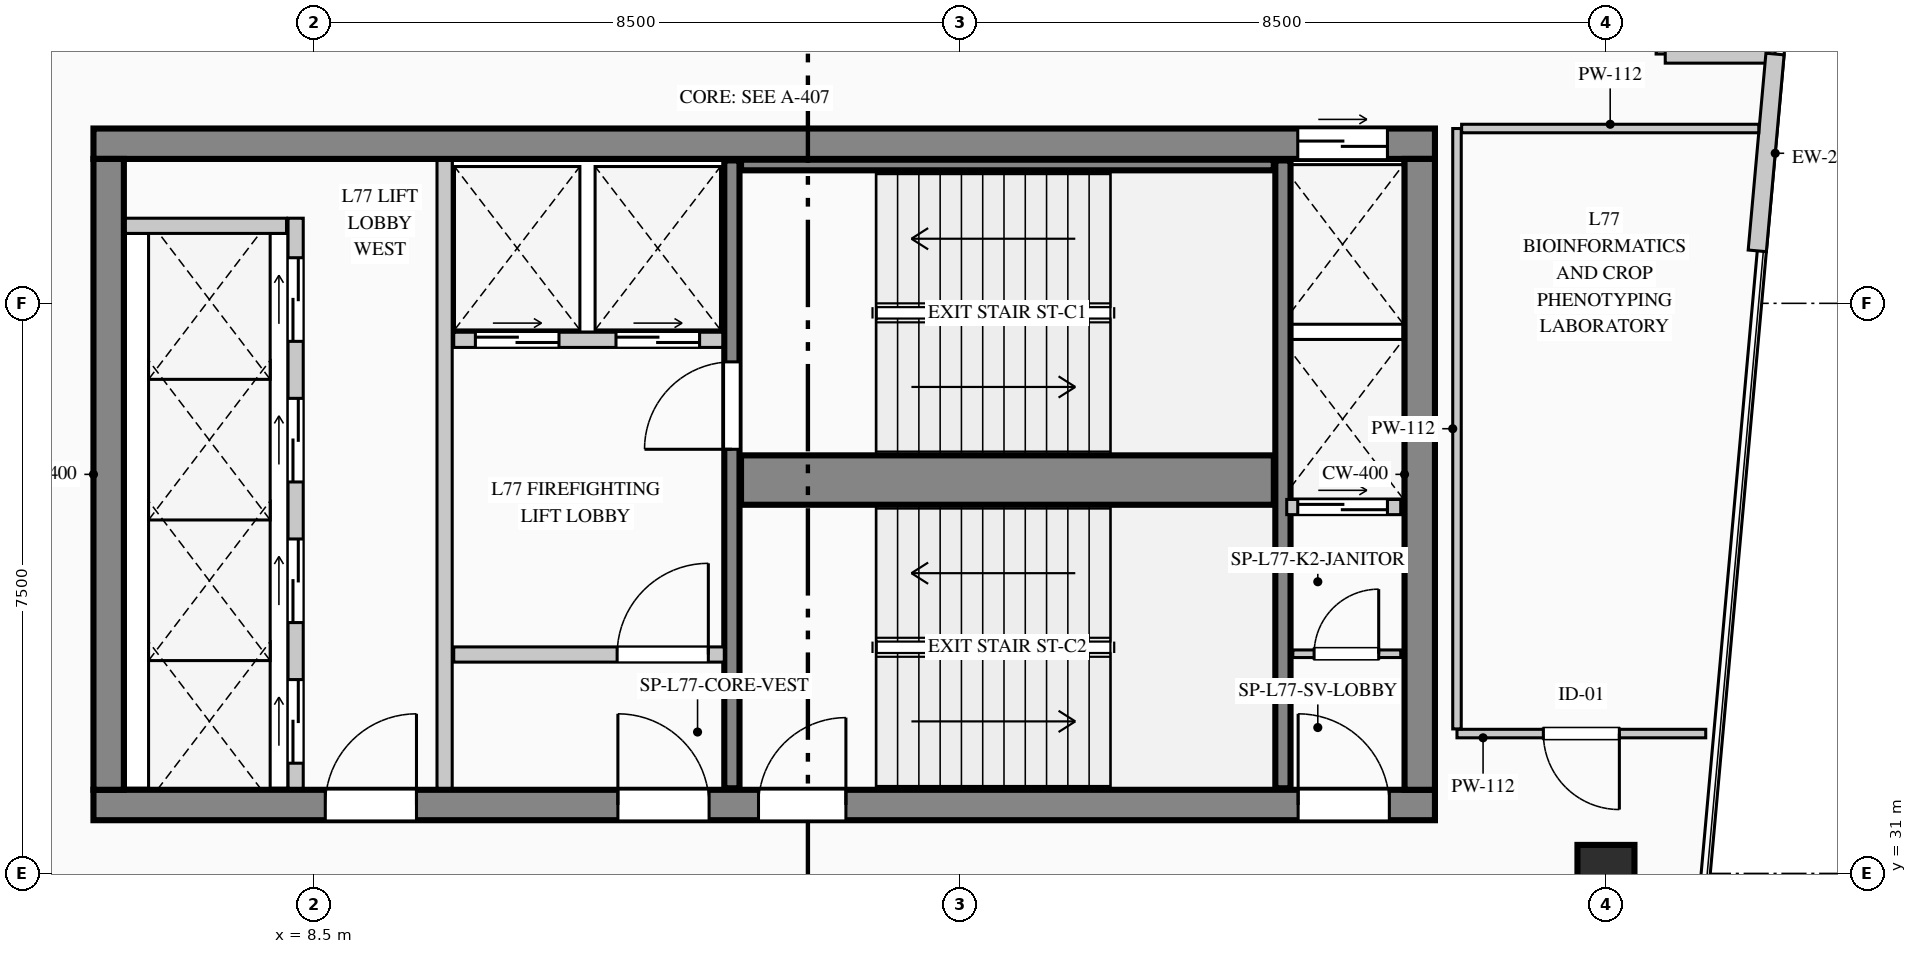
"""IFC4 building model, lengths in metres.
Left out: names, types, materials, properties, quantities, classifications, styles, units other than length and angle.
Written with IfcOpenShell. Run it as: python <this file> out.ifc"""

import sys

from ifc_helpers import new_model, si_unit, direction, frame, frame_2d, origin, origin_2d, place, context, subcontext, project, spatial, rectangle, extrude, element, fill, save


model = new_model("IFC4")
c1 = context("Model", 3, precision=1e-05, world=origin(), true_north=direction((0.0, 1.0)))
c2 = subcontext(c1, "Body", "Model", "MODEL_VIEW")
j1 = project(units=[si_unit("LENGTHUNIT", "METRE"), si_unit("PLANEANGLEUNIT", "RADIAN")], contexts=[c1])
p1 = place(None, origin())
s1 = spatial("IfcSite", under=j1, at=p1, CompositionType="ELEMENT")
p2 = place(p1, origin())
s2 = spatial("IfcBuilding", under=s1, at=p2, CompositionType="ELEMENT")
p3 = place(p2, frame((0.0, 0.0, 319.9)))
s3 = spatial("IfcBuildingStorey", under=s2, at=p3, CompositionType="ELEMENT", Elevation=319.9)
p4 = place(p3, frame((5.6, 40.6, 0.0), z_axis=(0.0, 0.0, 1.0), x_axis=(1.0, 0.0, 0.0)))
e1 = element("IfcWall", 1, at=p4, inside=s3, PredefinedType="SHEAR", context=c2, shape_type="SweptSolid", body=[
    extrude(rectangle(XDim=17.65, YDim=0.4, at=frame_2d((8.825, 0.0))), origin(), (0.0, 0.0, 1.0), 4.15),
])
p5 = place(p4, frame((15.845, 0.0, 0.0)))
e2 = element("IfcOpeningElement", 2, at=p5, cuts=e1, PredefinedType="OPENING", context=c2, shape_type="SweptSolid", body=[
    extrude(rectangle(XDim=1.18, YDim=2.25, at=frame_2d((0.59, 1.125))), frame((0.0, 0.21, 0.0), z_axis=(0.0, -1.0, 0.0), x_axis=(1.0, 0.0, 0.0)), (0.0, 0.0, 1.0), 0.42),
])
p6 = place(p3, frame((5.6, 31.9, 0.0), z_axis=(0.0, 0.0, 1.0), x_axis=(1.0, 0.0, 0.0)))
e3 = element("IfcWall", 3, at=p6, inside=s3, PredefinedType="SHEAR", context=c2, shape_type="SweptSolid", body=[
    extrude(rectangle(XDim=17.65, YDim=0.4, at=frame_2d((8.825, 0.0))), origin(), (0.0, 0.0, 1.0), 4.15),
])
p7 = place(p6, frame((3.05, 0.0, 0.0)))
e4 = element("IfcOpeningElement", 4, at=p7, cuts=e3, PredefinedType="OPENING", context=c2, shape_type="SweptSolid", body=[
    extrude(rectangle(XDim=1.2, YDim=2.2, at=frame_2d((0.6, 1.1))), frame((0.0, 0.21, 0.0), z_axis=(0.0, -1.0, 0.0), x_axis=(1.0, 0.0, 0.0)), (0.0, 0.0, 1.0), 0.42),
])
p8 = place(p6, frame((6.9, 0.0, 0.0)))
e5 = element("IfcOpeningElement", 5, at=p8, cuts=e3, PredefinedType="OPENING", context=c2, shape_type="SweptSolid", body=[
    extrude(rectangle(XDim=1.2, YDim=2.2, at=frame_2d((0.6, 1.1))), frame((0.0, 0.21, 0.0), z_axis=(0.0, -1.0, 0.0), x_axis=(1.0, 0.0, 0.0)), (0.0, 0.0, 1.0), 0.42),
])
p9 = place(p6, frame((8.75, 0.0, 0.0)))
e6 = element("IfcOpeningElement", 6, at=p9, cuts=e3, PredefinedType="OPENING", context=c2, shape_type="SweptSolid", body=[
    extrude(rectangle(XDim=1.15, YDim=2.2, at=frame_2d((0.575, 1.1))), frame((0.0, 0.21, 0.0), z_axis=(0.0, -1.0, 0.0), x_axis=(1.0, 0.0, 0.0)), (0.0, 0.0, 1.0), 0.42),
])
p10 = place(p6, frame((15.85, 0.0, 0.0)))
e7 = element("IfcOpeningElement", 7, at=p10, cuts=e3, PredefinedType="OPENING", context=c2, shape_type="SweptSolid", body=[
    extrude(rectangle(XDim=1.2, YDim=2.2, at=frame_2d((0.6, 1.1))), frame((0.0, 0.21, 0.0), z_axis=(0.0, -1.0, 0.0), x_axis=(1.0, 0.0, 0.0)), (0.0, 0.0, 1.0), 0.42),
])
for number, where, z_axis, x_axis in (
    (8, (5.8, 32.1, 0.0), (0.0, 0.0, 1.0), (0.0, 1.0, 0.0)),
    (9, (23.05, 32.1, 0.0), (0.0, 0.0, 1.0), (0.0, 1.0, 0.0)),
):
    element("IfcWall", number, at=place(p3, frame(where, z_axis=z_axis, x_axis=x_axis)), inside=s3, PredefinedType="SHEAR", context=c2, shape_type="SweptSolid", body=[
        extrude(rectangle(XDim=8.3, YDim=0.4, at=frame_2d((4.15, 0.0))), origin(), (0.0, 0.0, 1.0), 4.15),
    ])
p11 = place(p3, frame((14.0, 32.12, 0.0), z_axis=(0.0, 0.0, 1.0), x_axis=(0.0, 1.0, 0.0)))
e10 = element("IfcWall", 10, at=p11, inside=s3, PredefinedType="SHEAR", context=c2, shape_type="SweptSolid", body=[
    extrude(rectangle(XDim=8.26, YDim=0.2, at=frame_2d((4.13, 0.0))), origin(), (0.0, 0.0, 1.0), 4.15),
])
p12 = place(p11, frame((4.46, 0.0, 0.0)))
e11 = element("IfcOpeningElement", 11, at=p12, cuts=e10, PredefinedType="OPENING", context=c2, shape_type="SweptSolid", body=[
    extrude(rectangle(XDim=1.15, YDim=2.2, at=frame_2d((0.575, 1.1))), frame((0.0, 0.11, 0.0), z_axis=(0.0, -1.0, 0.0), x_axis=(1.0, 0.0, 0.0)), (0.0, 0.0, 1.0), 0.22),
])
p13 = place(p3, frame((14.12, 36.175, 0.0), z_axis=(0.0, 0.0, 1.0), x_axis=(1.0, 0.0, 0.0)))
e12 = element("IfcWall", 12, at=p13, inside=s3, PredefinedType="SHEAR", context=c2, shape_type="SweptSolid", body=[
    extrude(rectangle(XDim=7.01, YDim=0.65, at=frame_2d((3.505, 0.0))), origin(), (0.0, 0.0, 1.0), 4.15),
])
p14 = place(p3, frame((21.25, 32.12, 0.0), z_axis=(0.0, 0.0, 1.0), x_axis=(0.0, 1.0, 0.0)))
e13 = element("IfcWall", 13, at=p14, inside=s3, PredefinedType="SHEAR", context=c2, shape_type="SweptSolid", body=[
    extrude(rectangle(XDim=8.26, YDim=0.2, at=frame_2d((4.13, 0.0))), origin(), (0.0, 0.0, 1.0), 4.15),
])
p15 = place(p3, frame((14.12, 40.32, 0.0), z_axis=(0.0, 0.0, 1.0), x_axis=(1.0, 0.0, 0.0)))
e14 = element("IfcWall", 14, at=p15, inside=s3, PredefinedType="SHEAR", context=c2, shape_type="SweptSolid", body=[
    extrude(rectangle(XDim=7.01, YDim=0.14, at=frame_2d((3.505, 0.0))), origin(), (0.0, 0.0, 1.0), 4.15),
])
p16 = place(p3, frame((25.5, 31.0, 0.0), z_axis=(0.0, 0.0, 1.0), x_axis=(1.0, 0.0, 0.0)))
e15 = element("IfcColumn", 15, at=p16, inside=s3, PredefinedType="COLUMN", context=c2, shape_type="SweptSolid", body=[
    extrude(rectangle(XDim=0.75, YDim=0.75, at=origin_2d()), origin(), (0.0, 0.0, 1.0), 4.15),
])
p17 = place(p3, frame((26.28, 43.38, 0.0), z_axis=(0.0, 0.0, 1.0), x_axis=(0.0, -1.0, 0.0)))
e16 = element("IfcWall", 16, at=p17, inside=s3, PredefinedType="STANDARD", context=c2, shape_type="SweptSolid", body=[
    extrude(rectangle(XDim=1.6, YDim=0.24, at=frame_2d((0.8, 0.0))), origin(), (0.0, 0.0, 1.0), 3.83),
])
p18 = place(p3, frame((26.28, 41.78, 0.0), z_axis=(0.0, 0.0, 1.0), x_axis=(1.0, 0.0, 0.0)))
e17 = element("IfcWall", 17, at=p18, inside=s3, PredefinedType="STANDARD", context=c2, shape_type="SweptSolid", body=[
    extrude(rectangle(XDim=1.444, YDim=0.24, at=frame_2d((0.722, 0.0))), origin(), (0.0, 0.0, 1.0), 3.83),
])
p19 = place(p3, frame((27.724, 41.78, 0.0), z_axis=(0.0, 0.0, 1.0), x_axis=(-0.089765303723, -0.995962946222, 0.0)))
e18 = element("IfcWall", 18, at=p19, inside=s3, PredefinedType="STANDARD", context=c2, shape_type="SweptSolid", body=[
    extrude(rectangle(XDim=2.6, YDim=0.24, at=frame_2d((1.3, 0.0))), origin(), (0.0, 0.0, 1.0), 3.83),
])
p20 = place(p3, frame((8.26, 32.12, 0.0), z_axis=(0.0, 0.0, 1.0), x_axis=(0.0, 1.0, 0.0)))
e19 = element("IfcWall", 19, at=p20, inside=s3, PredefinedType="PARTITIONING", context=c2, shape_type="SweptSolid", body=[
    extrude(rectangle(XDim=7.5, YDim=0.2, at=frame_2d((3.75, 0.0))), origin(), (0.0, 0.0, 1.0), 3.83),
])
p21 = place(p20, frame((0.33, 0.0, 0.0)))
e20 = element("IfcOpeningElement", 20, at=p21, cuts=e19, PredefinedType="OPENING", context=c2, shape_type="SweptSolid", body=[
    extrude(rectangle(XDim=1.1, YDim=2.2, at=frame_2d((0.55, 1.1))), frame((0.0, 0.11, 0.0), z_axis=(0.0, -1.0, 0.0), x_axis=(1.0, 0.0, 0.0)), (0.0, 0.0, 1.0), 0.22),
])
p22 = place(p20, frame((2.18, 0.0, 0.0)))
e21 = element("IfcOpeningElement", 21, at=p22, cuts=e19, PredefinedType="OPENING", context=c2, shape_type="SweptSolid", body=[
    extrude(rectangle(XDim=1.1, YDim=2.2, at=frame_2d((0.55, 1.1))), frame((0.0, 0.11, 0.0), z_axis=(0.0, -1.0, 0.0), x_axis=(1.0, 0.0, 0.0)), (0.0, 0.0, 1.0), 0.22),
])
p23 = place(p20, frame((4.03, 0.0, 0.0)))
e22 = element("IfcOpeningElement", 22, at=p23, cuts=e19, PredefinedType="OPENING", context=c2, shape_type="SweptSolid", body=[
    extrude(rectangle(XDim=1.1, YDim=2.2, at=frame_2d((0.55, 1.1))), frame((0.0, 0.11, 0.0), z_axis=(0.0, -1.0, 0.0), x_axis=(1.0, 0.0, 0.0)), (0.0, 0.0, 1.0), 0.22),
])
p24 = place(p20, frame((5.88, 0.0, 0.0)))
e23 = element("IfcOpeningElement", 23, at=p24, cuts=e19, PredefinedType="OPENING", context=c2, shape_type="SweptSolid", body=[
    extrude(rectangle(XDim=1.1, YDim=2.2, at=frame_2d((0.55, 1.1))), frame((0.0, 0.11, 0.0), z_axis=(0.0, -1.0, 0.0), x_axis=(1.0, 0.0, 0.0)), (0.0, 0.0, 1.0), 0.22),
])
p25 = place(p3, frame((6.02, 39.52, 0.0), z_axis=(0.0, 0.0, 1.0), x_axis=(1.0, 0.0, 0.0)))
e24 = element("IfcWall", 24, at=p25, inside=s3, PredefinedType="PARTITIONING", context=c2, shape_type="SweptSolid", body=[
    extrude(rectangle(XDim=2.12, YDim=0.2, at=frame_2d((1.06, 0.0))), origin(), (0.0, 0.0, 1.0), 3.83),
])
p26 = place(p3, frame((10.22, 32.12, 0.0), z_axis=(0.0, 0.0, 1.0), x_axis=(0.0, 1.0, 0.0)))
e25 = element("IfcWall", 25, at=p26, inside=s3, PredefinedType="PARTITIONING", context=c2, shape_type="SweptSolid", body=[
    extrude(rectangle(XDim=8.26, YDim=0.2, at=frame_2d((4.13, 0.0))), origin(), (0.0, 0.0, 1.0), 3.83),
])
p27 = place(p3, frame((10.34, 38.02, 0.0), z_axis=(0.0, 0.0, 1.0), x_axis=(1.0, 0.0, 0.0)))
e26 = element("IfcWall", 26, at=p27, inside=s3, PredefinedType="PARTITIONING", context=c2, shape_type="SweptSolid", body=[
    extrude(rectangle(XDim=3.54, YDim=0.2, at=frame_2d((1.77, 0.0))), origin(), (0.0, 0.0, 1.0), 3.83),
])
p28 = place(p27, frame((0.285, 0.0, 0.0)))
e27 = element("IfcOpeningElement", 27, at=p28, cuts=e26, PredefinedType="OPENING", context=c2, shape_type="SweptSolid", body=[
    extrude(rectangle(XDim=1.1, YDim=2.2, at=frame_2d((0.55, 1.1))), frame((0.0, 0.11, 0.0), z_axis=(0.0, -1.0, 0.0), x_axis=(1.0, 0.0, 0.0)), (0.0, 0.0, 1.0), 0.22),
])
p29 = place(p27, frame((2.135, 0.0, 0.0)))
e28 = element("IfcOpeningElement", 28, at=p29, cuts=e26, PredefinedType="OPENING", context=c2, shape_type="SweptSolid", body=[
    extrude(rectangle(XDim=1.1, YDim=2.2, at=frame_2d((0.55, 1.1))), frame((0.0, 0.11, 0.0), z_axis=(0.0, -1.0, 0.0), x_axis=(1.0, 0.0, 0.0)), (0.0, 0.0, 1.0), 0.22),
])
p30 = place(p3, frame((10.34, 33.88, 0.0), z_axis=(0.0, 0.0, 1.0), x_axis=(1.0, 0.0, 0.0)))
e29 = element("IfcWall", 29, at=p30, inside=s3, PredefinedType="PARTITIONING", context=c2, shape_type="SweptSolid", body=[
    extrude(rectangle(XDim=3.56, YDim=0.2, at=frame_2d((1.78, 0.0))), origin(), (0.0, 0.0, 1.0), 3.83),
])
p31 = place(p30, frame((2.15, 0.0, 0.0)))
e30 = element("IfcOpeningElement", 30, at=p31, cuts=e29, PredefinedType="OPENING", context=c2, shape_type="SweptSolid", body=[
    extrude(rectangle(XDim=1.2, YDim=2.2, at=frame_2d((0.6, 1.1))), frame((0.0, 0.11, 0.0), z_axis=(0.0, -1.0, 0.0), x_axis=(1.0, 0.0, 0.0)), (0.0, 0.0, 1.0), 0.22),
])
p32 = place(p3, frame((21.38, 33.89, 0.0), z_axis=(0.0, 0.0, 1.0), x_axis=(1.0, 0.0, 0.0)))
e31 = element("IfcWall", 31, at=p32, inside=s3, PredefinedType="PARTITIONING", context=c2, shape_type="SweptSolid", body=[
    extrude(rectangle(XDim=1.42, YDim=0.1, at=frame_2d((0.71, 0.0))), origin(), (0.0, 0.0, 1.0), 3.83),
])
p33 = place(p32, frame((0.28, 0.0, 0.0)))
e32 = element("IfcOpeningElement", 32, at=p33, cuts=e31, PredefinedType="OPENING", context=c2, shape_type="SweptSolid", body=[
    extrude(rectangle(XDim=0.85, YDim=2.1, at=frame_2d((0.425, 1.05))), frame((0.0, 0.06, 0.0), z_axis=(0.0, -1.0, 0.0), x_axis=(1.0, 0.0, 0.0)), (0.0, 0.0, 1.0), 0.12),
])
p34 = place(p3, frame((21.3, 35.82, 0.0), z_axis=(0.0, 0.0, 1.0), x_axis=(1.0, 0.0, 0.0)))
e33 = element("IfcWall", 33, at=p34, inside=s3, PredefinedType="PARTITIONING", context=c2, shape_type="SweptSolid", body=[
    extrude(rectangle(XDim=1.5, YDim=0.2, at=frame_2d((0.75, 0.0))), origin(), (0.0, 0.0, 1.0), 3.83),
])
p35 = place(p34, frame((0.145, 0.0, 0.0)))
e34 = element("IfcOpeningElement", 34, at=p35, cuts=e33, PredefinedType="OPENING", context=c2, shape_type="SweptSolid", body=[
    extrude(rectangle(XDim=1.18, YDim=2.25, at=frame_2d((0.59, 1.125))), frame((0.0, 0.11, 0.0), z_axis=(0.0, -1.0, 0.0), x_axis=(1.0, 0.0, 0.0)), (0.0, 0.0, 1.0), 0.22),
])
p36 = place(p3, frame((26.813, 32.84, 0.0), z_axis=(0.0, 0.0, 1.0), x_axis=(-1.0, 0.0, 0.0)))
e35 = element("IfcWall", 35, at=p36, inside=s3, PredefinedType="PARTITIONING", context=c2, shape_type="SweptSolid", body=[
    extrude(rectangle(XDim=3.273, YDim=0.112, at=frame_2d((1.636, 0.0))), origin(), (0.0, 0.0, 1.0), 3.83),
])
p37 = place(p36, frame((1.136, 0.0, 0.0)))
e36 = element("IfcOpeningElement", 36, at=p37, cuts=e35, PredefinedType="OPENING", context=c2, shape_type="SweptSolid", body=[
    extrude(rectangle(XDim=1.0, YDim=2.15, at=frame_2d((0.5, 1.075))), frame((0.0, 0.066, 0.0), z_axis=(0.0, -1.0, 0.0), x_axis=(1.0, 0.0, 0.0)), (0.0, 0.0, 1.0), 0.132),
])
p38 = place(p3, frame((23.54, 32.901, 0.0), z_axis=(0.0, 0.0, 1.0), x_axis=(0.0, 1.0, 0.0)))
e37 = element("IfcWall", 37, at=p38, inside=s3, PredefinedType="PARTITIONING", context=c2, shape_type="SweptSolid", body=[
    extrude(rectangle(XDim=7.899, YDim=0.112, at=frame_2d((3.95, 0.0))), origin(), (0.0, 0.0, 1.0), 3.83),
])
p39 = place(p3, frame((23.601, 40.8, 0.0), z_axis=(0.0, 0.0, 1.0), x_axis=(1.0, 0.0, 0.0)))
e38 = element("IfcWall", 38, at=p39, inside=s3, PredefinedType="PARTITIONING", context=c2, shape_type="SweptSolid", body=[
    extrude(rectangle(XDim=3.909, YDim=0.112, at=frame_2d((1.955, 0.0))), origin(), (0.0, 0.0, 1.0), 3.83),
])
p40 = place(p7, origin())
e39 = element("IfcDoor", 39, at=p40, inside=s3, OperationType="SINGLE_SWING_RIGHT", PredefinedType="DOOR", context=c2, shape_type="SweptSolid", body=[
    extrude(rectangle(XDim=1.2, YDim=2.2, at=frame_2d((0.6, 1.1))), frame((0.0, 0.025, 0.0), z_axis=(0.0, -1.0, 0.0), x_axis=(1.0, 0.0, 0.0)), (0.0, 0.0, 1.0), 0.05),
])
fill(e4, e39)
p41 = place(p8, origin())
e40 = element("IfcDoor", 40, at=p41, inside=s3, OperationType="SINGLE_SWING_LEFT", PredefinedType="DOOR", context=c2, shape_type="SweptSolid", body=[
    extrude(rectangle(XDim=1.2, YDim=2.2, at=frame_2d((0.6, 1.1))), frame((0.0, 0.025, 0.0), z_axis=(0.0, -1.0, 0.0), x_axis=(1.0, 0.0, 0.0)), (0.0, 0.0, 1.0), 0.05),
])
fill(e5, e40)
p42 = place(p9, origin())
e41 = element("IfcDoor", 41, at=p42, inside=s3, OperationType="SINGLE_SWING_RIGHT", PredefinedType="DOOR", context=c2, shape_type="SweptSolid", body=[
    extrude(rectangle(XDim=1.15, YDim=2.2, at=frame_2d((0.575, 1.1))), frame((0.0, 0.025, 0.0), z_axis=(0.0, -1.0, 0.0), x_axis=(1.0, 0.0, 0.0)), (0.0, 0.0, 1.0), 0.05),
])
fill(e6, e41)
p43 = place(p10, origin())
e42 = element("IfcDoor", 42, at=p43, inside=s3, OperationType="SINGLE_SWING_LEFT", PredefinedType="DOOR", context=c2, shape_type="SweptSolid", body=[
    extrude(rectangle(XDim=1.2, YDim=2.2, at=frame_2d((0.6, 1.1))), frame((0.0, 0.025, 0.0), z_axis=(0.0, -1.0, 0.0), x_axis=(1.0, 0.0, 0.0)), (0.0, 0.0, 1.0), 0.05),
])
fill(e7, e42)
p44 = place(p31, origin())
e43 = element("IfcDoor", 43, at=p44, inside=s3, OperationType="SINGLE_SWING_RIGHT", PredefinedType="DOOR", context=c2, shape_type="SweptSolid", body=[
    extrude(rectangle(XDim=1.2, YDim=2.2, at=frame_2d((0.6, 1.1))), frame((0.0, 0.025, 0.0), z_axis=(0.0, -1.0, 0.0), x_axis=(1.0, 0.0, 0.0)), (0.0, 0.0, 1.0), 0.05),
])
fill(e30, e43)
p45 = place(p33, origin())
e44 = element("IfcDoor", 44, at=p45, inside=s3, OperationType="SINGLE_SWING_RIGHT", PredefinedType="DOOR", context=c2, shape_type="SweptSolid", body=[
    extrude(rectangle(XDim=0.85, YDim=2.1, at=frame_2d((0.425, 1.05))), frame((0.0, 0.025, 0.0), z_axis=(0.0, -1.0, 0.0), x_axis=(1.0, 0.0, 0.0)), (0.0, 0.0, 1.0), 0.05),
])
fill(e32, e44)
p46 = place(p12, origin())
e45 = element("IfcDoor", 45, at=p46, inside=s3, OperationType="SINGLE_SWING_LEFT", PredefinedType="DOOR", context=c2, shape_type="SweptSolid", body=[
    extrude(rectangle(XDim=1.15, YDim=2.2, at=frame_2d((0.575, 1.1))), frame((0.0, 0.025, 0.0), z_axis=(0.0, -1.0, 0.0), x_axis=(1.0, 0.0, 0.0)), (0.0, 0.0, 1.0), 0.05),
])
fill(e11, e45)
p47 = place(p21, origin())
e46 = element("IfcDoor", 46, at=p47, inside=s3, OperationType="DOUBLE_DOOR_SLIDING", PredefinedType="DOOR", context=c2, shape_type="SweptSolid", body=[
    extrude(rectangle(XDim=1.1, YDim=2.2, at=frame_2d((0.55, 1.1))), frame((0.0, 0.025, 0.0), z_axis=(0.0, -1.0, 0.0), x_axis=(1.0, 0.0, 0.0)), (0.0, 0.0, 1.0), 0.05),
])
fill(e20, e46)
p48 = place(p22, origin())
e47 = element("IfcDoor", 47, at=p48, inside=s3, OperationType="DOUBLE_DOOR_SLIDING", PredefinedType="DOOR", context=c2, shape_type="SweptSolid", body=[
    extrude(rectangle(XDim=1.1, YDim=2.2, at=frame_2d((0.55, 1.1))), frame((0.0, 0.025, 0.0), z_axis=(0.0, -1.0, 0.0), x_axis=(1.0, 0.0, 0.0)), (0.0, 0.0, 1.0), 0.05),
])
fill(e21, e47)
p49 = place(p23, origin())
e48 = element("IfcDoor", 48, at=p49, inside=s3, OperationType="DOUBLE_DOOR_SLIDING", PredefinedType="DOOR", context=c2, shape_type="SweptSolid", body=[
    extrude(rectangle(XDim=1.1, YDim=2.2, at=frame_2d((0.55, 1.1))), frame((0.0, 0.025, 0.0), z_axis=(0.0, -1.0, 0.0), x_axis=(1.0, 0.0, 0.0)), (0.0, 0.0, 1.0), 0.05),
])
fill(e22, e48)
p50 = place(p24, origin())
e49 = element("IfcDoor", 49, at=p50, inside=s3, OperationType="DOUBLE_DOOR_SLIDING", PredefinedType="DOOR", context=c2, shape_type="SweptSolid", body=[
    extrude(rectangle(XDim=1.1, YDim=2.2, at=frame_2d((0.55, 1.1))), frame((0.0, 0.025, 0.0), z_axis=(0.0, -1.0, 0.0), x_axis=(1.0, 0.0, 0.0)), (0.0, 0.0, 1.0), 0.05),
])
fill(e23, e49)
p51 = place(p28, origin())
e50 = element("IfcDoor", 50, at=p51, inside=s3, OperationType="DOUBLE_DOOR_SLIDING", PredefinedType="DOOR", context=c2, shape_type="SweptSolid", body=[
    extrude(rectangle(XDim=1.1, YDim=2.2, at=frame_2d((0.55, 1.1))), frame((0.0, 0.025, 0.0), z_axis=(0.0, -1.0, 0.0), x_axis=(1.0, 0.0, 0.0)), (0.0, 0.0, 1.0), 0.05),
])
fill(e27, e50)
p52 = place(p29, origin())
e51 = element("IfcDoor", 51, at=p52, inside=s3, OperationType="DOUBLE_DOOR_SLIDING", PredefinedType="DOOR", context=c2, shape_type="SweptSolid", body=[
    extrude(rectangle(XDim=1.1, YDim=2.2, at=frame_2d((0.55, 1.1))), frame((0.0, 0.025, 0.0), z_axis=(0.0, -1.0, 0.0), x_axis=(1.0, 0.0, 0.0)), (0.0, 0.0, 1.0), 0.05),
])
fill(e28, e51)
p53 = place(p5, origin())
e52 = element("IfcDoor", 52, at=p53, inside=s3, OperationType="DOUBLE_DOOR_SLIDING", PredefinedType="DOOR", context=c2, shape_type="SweptSolid", body=[
    extrude(rectangle(XDim=1.18, YDim=2.25, at=frame_2d((0.59, 1.125))), frame((0.0, 0.025, 0.0), z_axis=(0.0, -1.0, 0.0), x_axis=(1.0, 0.0, 0.0)), (0.0, 0.0, 1.0), 0.05),
])
fill(e2, e52)
p54 = place(p35, origin())
e53 = element("IfcDoor", 53, at=p54, inside=s3, OperationType="DOUBLE_DOOR_SLIDING", PredefinedType="DOOR", context=c2, shape_type="SweptSolid", body=[
    extrude(rectangle(XDim=1.18, YDim=2.25, at=frame_2d((0.59, 1.125))), frame((0.0, 0.025, 0.0), z_axis=(0.0, -1.0, 0.0), x_axis=(1.0, 0.0, 0.0)), (0.0, 0.0, 1.0), 0.05),
])
fill(e34, e53)
p55 = place(p37, origin())
e54 = element("IfcDoor", 54, at=p55, inside=s3, OperationType="SINGLE_SWING_LEFT", PredefinedType="DOOR", context=c2, shape_type="SweptSolid", body=[
    extrude(rectangle(XDim=1.0, YDim=2.15, at=frame_2d((0.5, 1.075))), frame((0.0, 0.025, 0.0), z_axis=(0.0, -1.0, 0.0), x_axis=(1.0, 0.0, 0.0)), (0.0, 0.0, 1.0), 0.05),
])
fill(e36, e54)
save(model, sys.argv[1])
